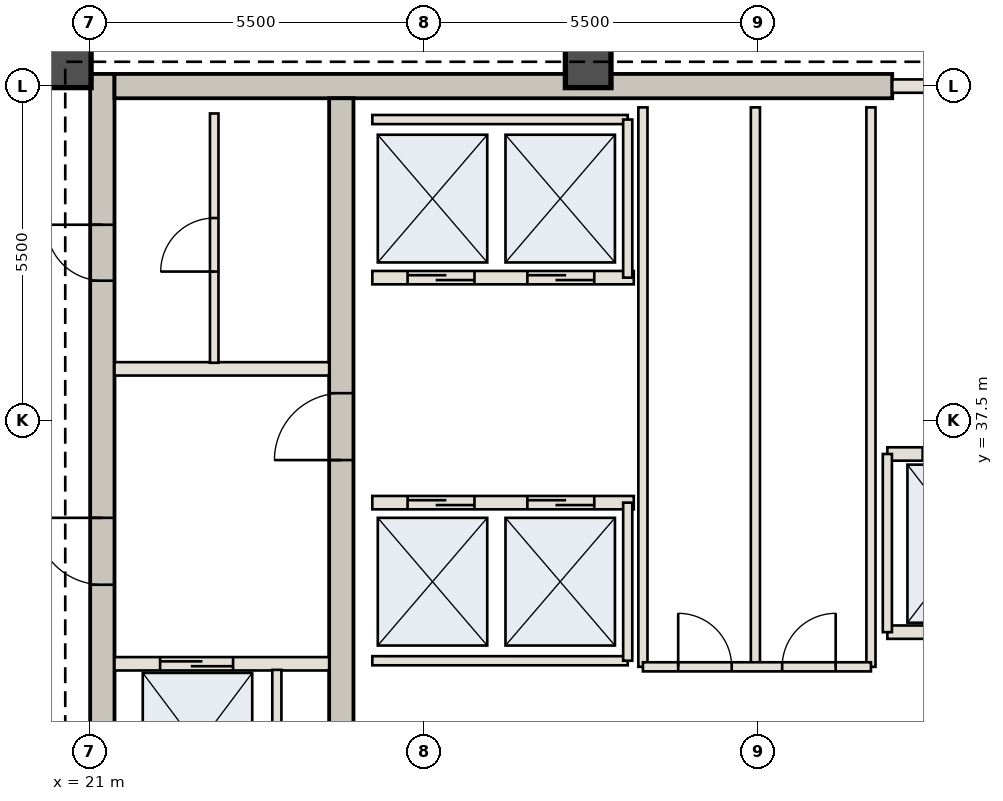
"""IFC4 building model, lengths in metres.
Left out: names, types, materials, properties, quantities, classifications, styles, units other than length and angle.
Written with IfcOpenShell. Run it as: python <this file> out.ifc"""

import sys

from ifc_helpers import new_model, si_unit, direction, frame, frame_2d, origin, origin_2d, place, context, subcontext, project, spatial, rectangle, extrude, element, fill, save


model = new_model("IFC4")
c1 = context("Model", 3, precision=1e-05, world=origin(), true_north=direction((0.0, 1.0)))
c2 = subcontext(c1, "Body", "Model", "MODEL_VIEW")
j1 = project(units=[si_unit("LENGTHUNIT", "METRE"), si_unit("PLANEANGLEUNIT", "RADIAN")], contexts=[c1])
p1 = place(None, origin())
s1 = spatial("IfcSite", under=j1, at=p1, CompositionType="ELEMENT")
p2 = place(p1, origin())
s2 = spatial("IfcBuilding", under=s1, at=p2, CompositionType="ELEMENT")
p3 = place(p2, frame((0.0, 0.0, 257.6)))
s3 = spatial("IfcBuildingStorey", under=s2, at=p3, CompositionType="ELEMENT", Elevation=257.6)
p4 = place(p3, frame((21.21, 30.6, 0.0), z_axis=(0.0, 0.0, 1.0), x_axis=(0.0, 1.0, 0.0)))
e1 = element("IfcWall", 1, at=p4, inside=s3, PredefinedType="SHEAR", context=c2, shape_type="SweptSolid", body=[
    extrude(rectangle(XDim=12.6, YDim=0.4, at=frame_2d((6.3, 0.0))), origin(), (0.0, 0.0, 1.0), 4.55),
])
p5 = place(p4, frame((4.2, 0.0, 0.0)))
e2 = element("IfcOpeningElement", 2, at=p5, cuts=e1, PredefinedType="OPENING", context=c2, shape_type="SweptSolid", body=[
    extrude(rectangle(XDim=1.1, YDim=2.15, at=frame_2d((0.55, 1.075))), frame((0.0, 0.21, 0.0), z_axis=(0.0, -1.0, 0.0), x_axis=(1.0, 0.0, 0.0)), (0.0, 0.0, 1.0), 0.42),
])
p6 = place(p4, frame((9.2, 0.0, 0.0)))
e3 = element("IfcOpeningElement", 3, at=p6, cuts=e1, PredefinedType="OPENING", context=c2, shape_type="SweptSolid", body=[
    extrude(rectangle(XDim=0.92, YDim=2.1, at=frame_2d((0.46, 1.05))), frame((0.0, 0.21, 0.0), z_axis=(0.0, -1.0, 0.0), x_axis=(1.0, 0.0, 0.0)), (0.0, 0.0, 1.0), 0.42),
])
p7 = place(p3, frame((21.41, 43.0, 0.0), z_axis=(0.0, 0.0, 1.0), x_axis=(1.0, 0.0, 0.0)))
e4 = element("IfcWall", 4, at=p7, inside=s3, PredefinedType="SHEAR", context=c2, shape_type="SweptSolid", body=[
    extrude(rectangle(XDim=12.79, YDim=0.4, at=frame_2d((6.395, 0.0))), origin(), (0.0, 0.0, 1.0), 4.55),
])
p8 = place(p3, frame((25.14, 30.6, 0.0), z_axis=(0.0, 0.0, 1.0), x_axis=(0.0, 1.0, 0.0)))
e5 = element("IfcWall", 5, at=p8, inside=s3, PredefinedType="SHEAR", context=c2, shape_type="SweptSolid", body=[
    extrude(rectangle(XDim=12.2, YDim=0.4, at=frame_2d((6.1, 0.0))), origin(), (0.0, 0.0, 1.0), 4.55),
])
p9 = place(p8, frame((6.25, 0.0, 0.0)))
e6 = element("IfcOpeningElement", 6, at=p9, cuts=e5, PredefinedType="OPENING", context=c2, shape_type="SweptSolid", body=[
    extrude(rectangle(XDim=1.1, YDim=2.15, at=frame_2d((0.55, 1.075))), frame((0.0, 0.21, 0.0), z_axis=(0.0, -1.0, 0.0), x_axis=(1.0, 0.0, 0.0)), (0.0, 0.0, 1.0), 0.42),
])
for number, where, z_axis, x_axis in (
    (7, (29.2, 43.35, 0.0), (0.0, 0.0, 1.0), (1.0, 0.0, 0.0)),
    (8, (20.65, 43.35, 0.0), (0.0, 0.0, 1.0), (1.0, 0.0, 0.0)),
):
    element("IfcColumn", number, at=place(p3, frame(where, z_axis=z_axis, x_axis=x_axis)), inside=s3, PredefinedType="COLUMN", context=c2, shape_type="SweptSolid", body=[
        extrude(rectangle(XDim=0.75, YDim=0.75, at=origin_2d()), origin(), (0.0, 0.0, 1.0), 4.55),
    ])
p10 = place(p3, frame((21.41, 33.5, 0.0), z_axis=(0.0, 0.0, 1.0), x_axis=(1.0, 0.0, 0.0)))
e9 = element("IfcWall", 9, at=p10, inside=s3, PredefinedType="STANDARD", context=c2, shape_type="SweptSolid", body=[
    extrude(rectangle(XDim=3.53, YDim=0.22, at=frame_2d((1.765, 0.0))), origin(), (0.0, 0.0, 1.0), 4.13),
])
p11 = place(p10, frame((0.75, 0.0, 0.0)))
e10 = element("IfcOpeningElement", 10, at=p11, cuts=e9, PredefinedType="OPENING", context=c2, shape_type="SweptSolid", body=[
    extrude(rectangle(XDim=1.2, YDim=2.2, at=frame_2d((0.6, 1.1))), frame((0.0, 0.12, 0.0), z_axis=(0.0, -1.0, 0.0), x_axis=(1.0, 0.0, 0.0)), (0.0, 0.0, 1.0), 0.24),
])
p12 = place(p3, frame((24.08, 30.75, 0.0), z_axis=(0.0, 0.0, 1.0), x_axis=(0.0, 1.0, 0.0)))
e11 = element("IfcWall", 11, at=p12, inside=s3, PredefinedType="STANDARD", context=c2, shape_type="SweptSolid", body=[
    extrude(rectangle(XDim=2.65, YDim=0.15, at=frame_2d((1.325, 0.0))), origin(), (0.0, 0.0, 1.0), 4.13),
])
p13 = place(p3, frame((21.41, 38.35, 0.0), z_axis=(0.0, 0.0, 1.0), x_axis=(1.0, 0.0, 0.0)))
e12 = element("IfcWall", 12, at=p13, inside=s3, PredefinedType="STANDARD", context=c2, shape_type="SweptSolid", body=[
    extrude(rectangle(XDim=3.53, YDim=0.22, at=frame_2d((1.765, 0.0))), origin(), (0.0, 0.0, 1.0), 4.13),
])
p14 = place(p3, frame((23.05, 38.45, 0.0), z_axis=(0.0, 0.0, 1.0), x_axis=(0.0, 1.0, 0.0)))
e13 = element("IfcWall", 13, at=p14, inside=s3, PredefinedType="STANDARD", context=c2, shape_type="SweptSolid", body=[
    extrude(rectangle(XDim=4.1, YDim=0.14, at=frame_2d((2.05, 0.0))), origin(), (0.0, 0.0, 1.0), 4.13),
])
p15 = place(p14, frame((1.5, 0.0, 0.0)))
e14 = element("IfcOpeningElement", 14, at=p15, cuts=e13, PredefinedType="OPENING", context=c2, shape_type="SweptSolid", body=[
    extrude(rectangle(XDim=0.88, YDim=2.1, at=frame_2d((0.44, 1.05))), frame((0.0, 0.08, 0.0), z_axis=(0.0, -1.0, 0.0), x_axis=(1.0, 0.0, 0.0)), (0.0, 0.0, 1.0), 0.16),
])
p16 = place(p3, frame((25.65, 36.15, 0.0), z_axis=(0.0, 0.0, 1.0), x_axis=(1.0, 0.0, 0.0)))
e15 = element("IfcWall", 15, at=p16, inside=s3, PredefinedType="STANDARD", context=c2, shape_type="SweptSolid", body=[
    extrude(rectangle(XDim=4.3, YDim=0.22, at=frame_2d((2.15, 0.0))), origin(), (0.0, 0.0, 1.0), 4.13),
])
p17 = place(p16, frame((0.58, 0.0, 0.0)))
e16 = element("IfcOpeningElement", 16, at=p17, cuts=e15, PredefinedType="OPENING", context=c2, shape_type="SweptSolid", body=[
    extrude(rectangle(XDim=1.1, YDim=2.15, at=frame_2d((0.55, 1.075))), frame((0.0, 0.12, 0.0), z_axis=(0.0, -1.0, 0.0), x_axis=(1.0, 0.0, 0.0)), (0.0, 0.0, 1.0), 0.24),
])
p18 = place(p16, frame((2.55, 0.0, 0.0)))
e17 = element("IfcOpeningElement", 17, at=p18, cuts=e15, PredefinedType="OPENING", context=c2, shape_type="SweptSolid", body=[
    extrude(rectangle(XDim=1.1, YDim=2.15, at=frame_2d((0.55, 1.075))), frame((0.0, 0.12, 0.0), z_axis=(0.0, -1.0, 0.0), x_axis=(1.0, 0.0, 0.0)), (0.0, 0.0, 1.0), 0.24),
])
p19 = place(p3, frame((25.65, 33.55, 0.0), z_axis=(0.0, 0.0, 1.0), x_axis=(1.0, 0.0, 0.0)))
e18 = element("IfcWall", 18, at=p19, inside=s3, PredefinedType="STANDARD", context=c2, shape_type="SweptSolid", body=[
    extrude(rectangle(XDim=4.2, YDim=0.15, at=frame_2d((2.1, 0.0))), origin(), (0.0, 0.0, 1.0), 4.13),
])
p20 = place(p3, frame((29.85, 33.55, 0.0), z_axis=(0.0, 0.0, 1.0), x_axis=(0.0, 1.0, 0.0)))
e19 = element("IfcWall", 19, at=p20, inside=s3, PredefinedType="STANDARD", context=c2, shape_type="SweptSolid", body=[
    extrude(rectangle(XDim=2.6, YDim=0.15, at=frame_2d((1.3, 0.0))), origin(), (0.0, 0.0, 1.0), 4.13),
])
p21 = place(p3, frame((25.65, 39.85, 0.0), z_axis=(0.0, 0.0, 1.0), x_axis=(1.0, 0.0, 0.0)))
e20 = element("IfcWall", 20, at=p21, inside=s3, PredefinedType="STANDARD", context=c2, shape_type="SweptSolid", body=[
    extrude(rectangle(XDim=4.3, YDim=0.22, at=frame_2d((2.15, 0.0))), origin(), (0.0, 0.0, 1.0), 4.13),
])
p22 = place(p21, frame((0.58, 0.0, 0.0)))
e21 = element("IfcOpeningElement", 21, at=p22, cuts=e20, PredefinedType="OPENING", context=c2, shape_type="SweptSolid", body=[
    extrude(rectangle(XDim=1.1, YDim=2.15, at=frame_2d((0.55, 1.075))), frame((0.0, 0.12, 0.0), z_axis=(0.0, -1.0, 0.0), x_axis=(1.0, 0.0, 0.0)), (0.0, 0.0, 1.0), 0.24),
])
p23 = place(p21, frame((2.55, 0.0, 0.0)))
e22 = element("IfcOpeningElement", 22, at=p23, cuts=e20, PredefinedType="OPENING", context=c2, shape_type="SweptSolid", body=[
    extrude(rectangle(XDim=1.1, YDim=2.15, at=frame_2d((0.55, 1.075))), frame((0.0, 0.12, 0.0), z_axis=(0.0, -1.0, 0.0), x_axis=(1.0, 0.0, 0.0)), (0.0, 0.0, 1.0), 0.24),
])
p24 = place(p3, frame((25.65, 42.45, 0.0), z_axis=(0.0, 0.0, 1.0), x_axis=(1.0, 0.0, 0.0)))
e23 = element("IfcWall", 23, at=p24, inside=s3, PredefinedType="STANDARD", context=c2, shape_type="SweptSolid", body=[
    extrude(rectangle(XDim=4.2, YDim=0.15, at=frame_2d((2.1, 0.0))), origin(), (0.0, 0.0, 1.0), 4.13),
])
p25 = place(p3, frame((29.85, 39.85, 0.0), z_axis=(0.0, 0.0, 1.0), x_axis=(0.0, 1.0, 0.0)))
e24 = element("IfcWall", 24, at=p25, inside=s3, PredefinedType="STANDARD", context=c2, shape_type="SweptSolid", body=[
    extrude(rectangle(XDim=2.6, YDim=0.15, at=frame_2d((1.3, 0.0))), origin(), (0.0, 0.0, 1.0), 4.13),
])
for number, where, z_axis, x_axis in (
    (25, (30.1, 33.45, 0.0), (0.0, 0.0, 1.0), (0.0, 1.0, 0.0)),
    (26, (31.95, 33.45, 0.0), (0.0, 0.0, 1.0), (0.0, 1.0, 0.0)),
    (27, (33.85, 33.45, 0.0), (0.0, 0.0, 1.0), (0.0, 1.0, 0.0)),
):
    element("IfcWall", number, at=place(p3, frame(where, z_axis=z_axis, x_axis=x_axis)), inside=s3, PredefinedType="STANDARD", context=c2, shape_type="SweptSolid", body=[
        extrude(rectangle(XDim=9.2, YDim=0.15, at=frame_2d((4.6, 0.0))), origin(), (0.0, 0.0, 1.0), 4.13),
    ])
p26 = place(p3, frame((30.1, 33.45, 0.0), z_axis=(0.0, 0.0, 1.0), x_axis=(1.0, 0.0, 0.0)))
e28 = element("IfcWall", 28, at=p26, inside=s3, PredefinedType="STANDARD", context=c2, shape_type="SweptSolid", body=[
    extrude(rectangle(XDim=3.75, YDim=0.15, at=frame_2d((1.875, 0.0))), origin(), (0.0, 0.0, 1.0), 4.13),
])
p27 = place(p26, frame((0.58, 0.0, 0.0)))
e29 = element("IfcOpeningElement", 29, at=p27, cuts=e28, PredefinedType="OPENING", context=c2, shape_type="SweptSolid", body=[
    extrude(rectangle(XDim=0.88, YDim=2.1, at=frame_2d((0.44, 1.05))), frame((0.0, 0.085, 0.0), z_axis=(0.0, -1.0, 0.0), x_axis=(1.0, 0.0, 0.0)), (0.0, 0.0, 1.0), 0.17),
])
p28 = place(p26, frame((2.29, 0.0, 0.0)))
e30 = element("IfcOpeningElement", 30, at=p28, cuts=e28, PredefinedType="OPENING", context=c2, shape_type="SweptSolid", body=[
    extrude(rectangle(XDim=0.88, YDim=2.1, at=frame_2d((0.44, 1.05))), frame((0.0, 0.085, 0.0), z_axis=(0.0, -1.0, 0.0), x_axis=(1.0, 0.0, 0.0)), (0.0, 0.0, 1.0), 0.17),
])
p29 = place(p3, frame((34.2, 43.0, 0.0), z_axis=(0.0, 0.0, 1.0), x_axis=(1.0, 0.0, 0.0)))
e31 = element("IfcWall", 31, at=p29, inside=s3, PredefinedType="STANDARD", context=c2, shape_type="SweptSolid", body=[
    extrude(rectangle(XDim=3.55, YDim=0.22, at=frame_2d((1.775, 0.0))), origin(), (0.0, 0.0, 1.0), 4.13),
])
p30 = place(p29, frame((1.4, 0.0, 0.0)))
e32 = element("IfcOpeningElement", 32, at=p30, cuts=e31, PredefinedType="OPENING", context=c2, shape_type="SweptSolid", body=[
    extrude(rectangle(XDim=1.1, YDim=2.15, at=frame_2d((0.55, 1.075))), frame((0.0, 0.12, 0.0), z_axis=(0.0, -1.0, 0.0), x_axis=(1.0, 0.0, 0.0)), (0.0, 0.0, 1.0), 0.24),
])
p31 = place(p3, frame((34.12, 36.95, 0.0), z_axis=(0.0, 0.0, 1.0), x_axis=(1.0, 0.0, 0.0)))
e33 = element("IfcWall", 33, at=p31, inside=s3, PredefinedType="STANDARD", context=c2, shape_type="SweptSolid", body=[
    extrude(rectangle(XDim=2.68, YDim=0.22, at=frame_2d((1.34, 0.0))), origin(), (0.0, 0.0, 1.0), 4.13),
])
p32 = place(p31, frame((0.58, 0.0, 0.0)))
e34 = element("IfcOpeningElement", 34, at=p32, cuts=e33, PredefinedType="OPENING", context=c2, shape_type="SweptSolid", body=[
    extrude(rectangle(XDim=1.2, YDim=2.2, at=frame_2d((0.6, 1.1))), frame((0.0, 0.12, 0.0), z_axis=(0.0, -1.0, 0.0), x_axis=(1.0, 0.0, 0.0)), (0.0, 0.0, 1.0), 0.24),
])
p33 = place(p3, frame((34.12, 34.02, 0.0), z_axis=(0.0, 0.0, 1.0), x_axis=(1.0, 0.0, 0.0)))
e35 = element("IfcWall", 35, at=p33, inside=s3, PredefinedType="STANDARD", context=c2, shape_type="SweptSolid", body=[
    extrude(rectangle(XDim=2.68, YDim=0.22, at=frame_2d((1.34, 0.0))), origin(), (0.0, 0.0, 1.0), 4.13),
])
p34 = place(p3, frame((34.12, 34.02, 0.0), z_axis=(0.0, 0.0, 1.0), x_axis=(0.0, 1.0, 0.0)))
e36 = element("IfcWall", 36, at=p34, inside=s3, PredefinedType="STANDARD", context=c2, shape_type="SweptSolid", body=[
    extrude(rectangle(XDim=2.93, YDim=0.15, at=frame_2d((1.465, 0.0))), origin(), (0.0, 0.0, 1.0), 4.13),
])
p35 = place(p5, origin())
e37 = element("IfcDoor", 37, at=p35, inside=s3, OperationType="SINGLE_SWING_RIGHT", PredefinedType="DOOR", context=c2, shape_type="SweptSolid", body=[
    extrude(rectangle(XDim=1.1, YDim=2.15, at=frame_2d((0.55, 1.075))), frame((0.0, 0.025, 0.0), z_axis=(0.0, -1.0, 0.0), x_axis=(1.0, 0.0, 0.0)), (0.0, 0.0, 1.0), 0.05),
])
fill(e2, e37)
p36 = place(p9, origin())
e38 = element("IfcDoor", 38, at=p36, inside=s3, OperationType="SINGLE_SWING_LEFT", PredefinedType="DOOR", context=c2, shape_type="SweptSolid", body=[
    extrude(rectangle(XDim=1.1, YDim=2.15, at=frame_2d((0.55, 1.075))), frame((0.0, 0.025, 0.0), z_axis=(0.0, -1.0, 0.0), x_axis=(1.0, 0.0, 0.0)), (0.0, 0.0, 1.0), 0.05),
])
fill(e6, e38)
p37 = place(p6, origin())
e39 = element("IfcDoor", 39, at=p37, inside=s3, OperationType="SINGLE_SWING_RIGHT", PredefinedType="DOOR", context=c2, shape_type="SweptSolid", body=[
    extrude(rectangle(XDim=0.92, YDim=2.1, at=frame_2d((0.46, 1.05))), frame((0.0, 0.025, 0.0), z_axis=(0.0, -1.0, 0.0), x_axis=(1.0, 0.0, 0.0)), (0.0, 0.0, 1.0), 0.05),
])
fill(e3, e39)
p38 = place(p11, origin())
e40 = element("IfcDoor", 40, at=p38, inside=s3, OperationType="DOUBLE_DOOR_SLIDING", PredefinedType="DOOR", context=c2, shape_type="SweptSolid", body=[
    extrude(rectangle(XDim=1.2, YDim=2.2, at=frame_2d((0.6, 1.1))), frame((0.0, 0.025, 0.0), z_axis=(0.0, -1.0, 0.0), x_axis=(1.0, 0.0, 0.0)), (0.0, 0.0, 1.0), 0.05),
])
fill(e10, e40)
p39 = place(p15, origin())
e41 = element("IfcDoor", 41, at=p39, inside=s3, OperationType="SINGLE_SWING_LEFT", PredefinedType="DOOR", context=c2, shape_type="SweptSolid", body=[
    extrude(rectangle(XDim=0.88, YDim=2.1, at=frame_2d((0.44, 1.05))), frame((0.0, 0.025, 0.0), z_axis=(0.0, -1.0, 0.0), x_axis=(1.0, 0.0, 0.0)), (0.0, 0.0, 1.0), 0.05),
])
fill(e14, e41)
p40 = place(p17, origin())
e42 = element("IfcDoor", 42, at=p40, inside=s3, OperationType="DOUBLE_DOOR_SLIDING", PredefinedType="DOOR", context=c2, shape_type="SweptSolid", body=[
    extrude(rectangle(XDim=1.1, YDim=2.15, at=frame_2d((0.55, 1.075))), frame((0.0, 0.025, 0.0), z_axis=(0.0, -1.0, 0.0), x_axis=(1.0, 0.0, 0.0)), (0.0, 0.0, 1.0), 0.05),
])
fill(e16, e42)
p41 = place(p18, origin())
e43 = element("IfcDoor", 43, at=p41, inside=s3, OperationType="DOUBLE_DOOR_SLIDING", PredefinedType="DOOR", context=c2, shape_type="SweptSolid", body=[
    extrude(rectangle(XDim=1.1, YDim=2.15, at=frame_2d((0.55, 1.075))), frame((0.0, 0.025, 0.0), z_axis=(0.0, -1.0, 0.0), x_axis=(1.0, 0.0, 0.0)), (0.0, 0.0, 1.0), 0.05),
])
fill(e17, e43)
p42 = place(p22, origin())
e44 = element("IfcDoor", 44, at=p42, inside=s3, OperationType="DOUBLE_DOOR_SLIDING", PredefinedType="DOOR", context=c2, shape_type="SweptSolid", body=[
    extrude(rectangle(XDim=1.1, YDim=2.15, at=frame_2d((0.55, 1.075))), frame((0.0, 0.025, 0.0), z_axis=(0.0, -1.0, 0.0), x_axis=(1.0, 0.0, 0.0)), (0.0, 0.0, 1.0), 0.05),
])
fill(e21, e44)
p43 = place(p23, origin())
e45 = element("IfcDoor", 45, at=p43, inside=s3, OperationType="DOUBLE_DOOR_SLIDING", PredefinedType="DOOR", context=c2, shape_type="SweptSolid", body=[
    extrude(rectangle(XDim=1.1, YDim=2.15, at=frame_2d((0.55, 1.075))), frame((0.0, 0.025, 0.0), z_axis=(0.0, -1.0, 0.0), x_axis=(1.0, 0.0, 0.0)), (0.0, 0.0, 1.0), 0.05),
])
fill(e22, e45)
p44 = place(p27, origin())
e46 = element("IfcDoor", 46, at=p44, inside=s3, OperationType="SINGLE_SWING_LEFT", PredefinedType="DOOR", context=c2, shape_type="SweptSolid", body=[
    extrude(rectangle(XDim=0.88, YDim=2.1, at=frame_2d((0.44, 1.05))), frame((0.0, 0.025, 0.0), z_axis=(0.0, -1.0, 0.0), x_axis=(1.0, 0.0, 0.0)), (0.0, 0.0, 1.0), 0.05),
])
fill(e29, e46)
p45 = place(p28, origin())
e47 = element("IfcDoor", 47, at=p45, inside=s3, OperationType="SINGLE_SWING_RIGHT", PredefinedType="DOOR", context=c2, shape_type="SweptSolid", body=[
    extrude(rectangle(XDim=0.88, YDim=2.1, at=frame_2d((0.44, 1.05))), frame((0.0, 0.025, 0.0), z_axis=(0.0, -1.0, 0.0), x_axis=(1.0, 0.0, 0.0)), (0.0, 0.0, 1.0), 0.05),
])
fill(e30, e47)
p46 = place(p32, origin())
e48 = element("IfcDoor", 48, at=p46, inside=s3, OperationType="DOUBLE_DOOR_SLIDING", PredefinedType="DOOR", context=c2, shape_type="SweptSolid", body=[
    extrude(rectangle(XDim=1.2, YDim=2.2, at=frame_2d((0.6, 1.1))), frame((0.0, 0.025, 0.0), z_axis=(0.0, -1.0, 0.0), x_axis=(1.0, 0.0, 0.0)), (0.0, 0.0, 1.0), 0.05),
])
fill(e34, e48)
save(model, sys.argv[1])
